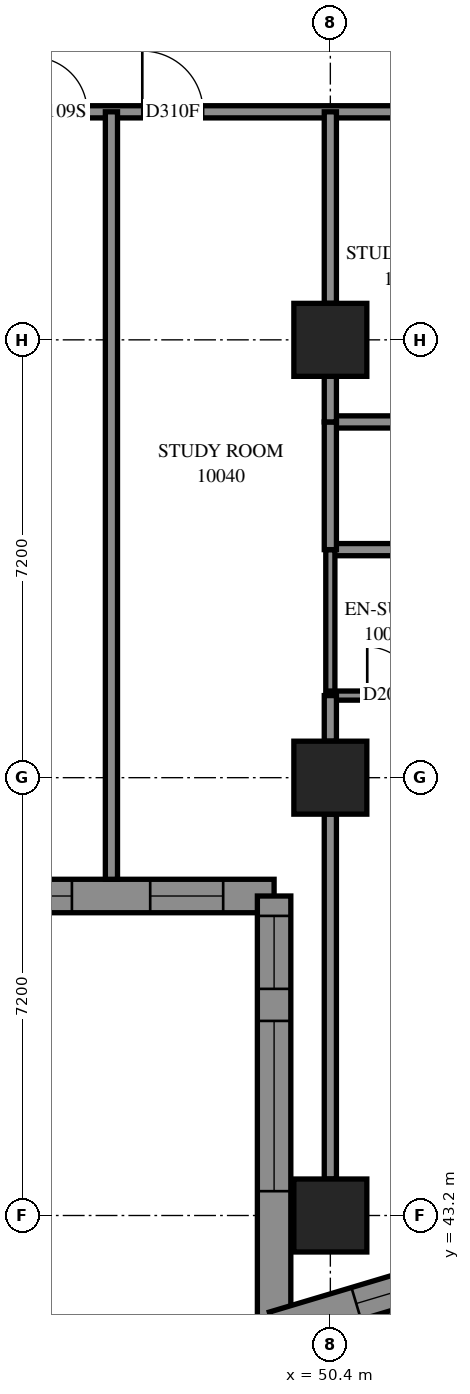
"""IFC4 building model, lengths in metres.
Left out: names, types, materials, properties, quantities, classifications, styles, units other than length and angle.
Written with IfcOpenShell. Run it as: python <this file> out.ifc"""

import sys

from ifc_helpers import new_model, si_unit, direction, frame, frame_2d, origin, origin_2d, place, context, subcontext, project, spatial, polyline, rectangle, outline, extrude, element, fill, save


model = new_model("IFC4")
c1 = context("Model", 3, precision=1e-05, world=origin(), true_north=direction((0.0, 1.0)))
c2 = subcontext(c1, "Body", "Model", "MODEL_VIEW")
j1 = project(units=[si_unit("LENGTHUNIT", "METRE"), si_unit("PLANEANGLEUNIT", "RADIAN")], contexts=[c1])
p1 = place(None, origin())
s1 = spatial("IfcSite", under=j1, at=p1, CompositionType="ELEMENT")
p2 = place(p1, origin())
s2 = spatial("IfcBuilding", under=s1, at=p2, CompositionType="ELEMENT")
p3 = place(p2, frame((0.0, 0.0, 40.6)))
s3 = spatial("IfcBuildingStorey", under=s2, at=p3, CompositionType="ELEMENT", Elevation=40.6)
for number, where, z_axis, x_axis in (
    (1, (50.4, 43.2, 0.0), (0.0, 0.0, 1.0), (1.0, 0.0, 0.0)),
    (2, (50.4, 50.4, 0.0), (0.0, 0.0, 1.0), (1.0, 0.0, 0.0)),
    (3, (50.4, 57.6, 0.0), (0.0, 0.0, 1.0), (1.0, 0.0, 0.0)),
):
    element("IfcColumn", number, at=place(p3, frame(where, z_axis=z_axis, x_axis=x_axis)), inside=s3, PredefinedType="COLUMN", context=c2, shape_type="SweptSolid", body=[
        extrude(rectangle(XDim=1.2, YDim=1.2, at=origin_2d()), origin(), (0.0, 0.0, 1.0), 3.1),
    ])
p4 = place(p3, frame((35.075, 48.454, 0.0), z_axis=(0.0, 0.0, 1.0), x_axis=(1.0, 0.0, 0.0)))
e4 = element("IfcWall", 4, at=p4, inside=s3, PredefinedType="SOLIDWALL", context=c2, shape_type="SweptSolid", body=[
    extrude(outline(polyline([(-0.275, -0.275), (14.125, -0.275), (14.675, 0.275), (0.275, 0.275), (-0.275, -0.275)])), origin(), (0.0, 0.0, 1.0), 3.1),
])
p5 = place(p4, frame((1.325, 0.0, 0.5)))
e5 = element("IfcOpeningElement", 5, at=p5, cuts=e4, PredefinedType="OPENING", context=c2, shape_type="SweptSolid", body=[
    extrude(rectangle(XDim=2.8, YDim=2.45, at=frame_2d((1.4, 1.225))), frame((0.0, 0.285, 0.0), z_axis=(0.0, -1.0, 0.0), x_axis=(1.0, 0.0, 0.0)), (0.0, 0.0, 1.0), 0.57),
])
p6 = place(p4, frame((4.925, 0.0, 0.5)))
e6 = element("IfcOpeningElement", 6, at=p6, cuts=e4, PredefinedType="OPENING", context=c2, shape_type="SweptSolid", body=[
    extrude(rectangle(XDim=2.8, YDim=2.45, at=frame_2d((1.4, 1.225))), frame((0.0, 0.285, 0.0), z_axis=(0.0, -1.0, 0.0), x_axis=(1.0, 0.0, 0.0)), (0.0, 0.0, 1.0), 0.57),
])
p7 = place(p4, frame((8.275, 0.0, 0.5)))
e7 = element("IfcOpeningElement", 7, at=p7, cuts=e4, PredefinedType="OPENING", context=c2, shape_type="SweptSolid", body=[
    extrude(rectangle(XDim=2.8, YDim=2.45, at=frame_2d((1.4, 1.225))), frame((0.0, 0.285, 0.0), z_axis=(0.0, -1.0, 0.0), x_axis=(1.0, 0.0, 0.0)), (0.0, 0.0, 1.0), 0.57),
])
p8 = place(p4, frame((12.363, 0.0, 0.5)))
e8 = element("IfcOpeningElement", 8, at=p8, cuts=e4, PredefinedType="OPENING", context=c2, shape_type="SweptSolid", body=[
    extrude(rectangle(XDim=1.2, YDim=2.45, at=frame_2d((0.6, 1.225))), frame((0.0, 0.285, 0.0), z_axis=(0.0, -1.0, 0.0), x_axis=(1.0, 0.0, 0.0)), (0.0, 0.0, 1.0), 0.57),
])
p9 = place(p3, frame((49.475, 48.454, 0.0), z_axis=(0.0, 0.0, 1.0), x_axis=(0.0, -1.0, 0.0)))
e9 = element("IfcWall", 9, at=p9, inside=s3, PredefinedType="SOLIDWALL", context=c2, shape_type="SweptSolid", body=[
    extrude(outline(polyline([(0.275, -0.275), (7.475, -0.275), (6.737, 0.275), (-0.275, 0.275), (0.275, -0.275)])), origin(), (0.0, 0.0, 1.0), 3.1),
])
p10 = place(p9, frame((2.054, 0.0, 0.5)))
e10 = element("IfcOpeningElement", 10, at=p10, cuts=e9, PredefinedType="OPENING", context=c2, shape_type="SweptSolid", body=[
    extrude(rectangle(XDim=2.8, YDim=2.45, at=frame_2d((1.4, 1.225))), frame((0.0, 0.285, 0.0), z_axis=(0.0, -1.0, 0.0), x_axis=(1.0, 0.0, 0.0)), (0.0, 0.0, 1.0), 0.57),
])
p11 = place(p9, frame((0.327, 0.0, 0.5)))
e11 = element("IfcOpeningElement", 11, at=p11, cuts=e9, PredefinedType="OPENING", context=c2, shape_type="SweptSolid", body=[
    extrude(rectangle(XDim=1.2, YDim=2.45, at=frame_2d((0.6, 1.225))), frame((0.0, 0.285, 0.0), z_axis=(0.0, -1.0, 0.0), x_axis=(1.0, 0.0, 0.0)), (0.0, 0.0, 1.0), 0.57),
])
p12 = place(p3, frame((49.475, 41.348, 0.0), z_axis=(0.0, 0.0, 1.0), x_axis=(0.9581327376, 0.2863243914, 0.0)))
e12 = element("IfcWall", 12, at=p12, inside=s3, PredefinedType="SOLIDWALL", context=c2, shape_type="SweptSolid", body=[
    extrude(outline(polyline([(-0.369, -0.275), (3.197, -0.275), (3.312, 0.275), (0.369, 0.275), (-0.369, -0.275)])), origin(), (0.0, 0.0, 1.0), 3.1),
])
p13 = place(p12, frame((1.41, 0.0, 0.5)))
e13 = element("IfcOpeningElement", 13, at=p13, cuts=e12, PredefinedType="OPENING", context=c2, shape_type="SweptSolid", body=[
    extrude(rectangle(XDim=1.2, YDim=2.45, at=frame_2d((0.6, 1.225))), frame((0.0, 0.285, 0.0), z_axis=(0.0, -1.0, 0.0), x_axis=(1.0, 0.0, 0.0)), (0.0, 0.0, 1.0), 0.57),
])
p14 = place(p3, frame((28.8, 61.35, 0.0), z_axis=(0.0, 0.0, 1.0), x_axis=(1.0, 0.0, 0.0)))
e14 = element("IfcWall", 14, at=p14, inside=s3, PredefinedType="PARTITIONING", context=c2, shape_type="SweptSolid", body=[
    extrude(rectangle(XDim=24.15, YDim=0.2, at=frame_2d((12.075, 0.0))), origin(), (0.0, 0.0, 1.0), 3.1),
])
p15 = place(p14, frame((2.3, 0.0, 0.0)))
e15 = element("IfcOpeningElement", 15, at=p15, cuts=e14, PredefinedType="OPENING", context=c2, shape_type="SweptSolid", body=[
    extrude(rectangle(XDim=0.9, YDim=2.1, at=frame_2d((0.45, 1.05))), frame((0.0, 0.11, 0.0), z_axis=(0.0, -1.0, 0.0), x_axis=(1.0, 0.0, 0.0)), (0.0, 0.0, 1.0), 0.22),
])
p16 = place(p14, frame((4.125, 0.0, 0.0)))
e16 = element("IfcOpeningElement", 16, at=p16, cuts=e14, PredefinedType="OPENING", context=c2, shape_type="SweptSolid", body=[
    extrude(rectangle(XDim=1.0, YDim=2.1, at=frame_2d((0.5, 1.05))), frame((0.0, 0.11, 0.0), z_axis=(0.0, -1.0, 0.0), x_axis=(1.0, 0.0, 0.0)), (0.0, 0.0, 1.0), 0.22),
])
p17 = place(p14, frame((11.061, 0.0, 0.0)))
e17 = element("IfcOpeningElement", 17, at=p17, cuts=e14, PredefinedType="OPENING", context=c2, shape_type="SweptSolid", body=[
    extrude(rectangle(XDim=0.9, YDim=2.1, at=frame_2d((0.45, 1.05))), frame((0.0, 0.11, 0.0), z_axis=(0.0, -1.0, 0.0), x_axis=(1.0, 0.0, 0.0)), (0.0, 0.0, 1.0), 0.22),
])
p18 = place(p14, frame((16.7, 0.0, 0.0)))
e18 = element("IfcOpeningElement", 18, at=p18, cuts=e14, PredefinedType="OPENING", context=c2, shape_type="SweptSolid", body=[
    extrude(rectangle(XDim=0.9, YDim=2.1, at=frame_2d((0.45, 1.05))), frame((0.0, 0.11, 0.0), z_axis=(0.0, -1.0, 0.0), x_axis=(1.0, 0.0, 0.0)), (0.0, 0.0, 1.0), 0.22),
])
p19 = place(p14, frame((18.508, 0.0, 0.0)))
e19 = element("IfcOpeningElement", 19, at=p19, cuts=e14, PredefinedType="OPENING", context=c2, shape_type="SweptSolid", body=[
    extrude(rectangle(XDim=1.0, YDim=2.1, at=frame_2d((0.5, 1.05))), frame((0.0, 0.11, 0.0), z_axis=(0.0, -1.0, 0.0), x_axis=(1.0, 0.0, 0.0)), (0.0, 0.0, 1.0), 0.22),
])
p20 = place(p14, frame((22.882, 0.0, 0.0)))
e20 = element("IfcOpeningElement", 20, at=p20, cuts=e14, PredefinedType="OPENING", context=c2, shape_type="SweptSolid", body=[
    extrude(rectangle(XDim=1.0, YDim=2.1, at=frame_2d((0.5, 1.05))), frame((0.0, 0.11, 0.0), z_axis=(0.0, -1.0, 0.0), x_axis=(1.0, 0.0, 0.0)), (0.0, 0.0, 1.0), 0.22),
])
p21 = place(p3, frame((46.8, 48.729, 0.0), z_axis=(0.0, 0.0, 1.0), x_axis=(0.0, 1.0, 0.0)))
e21 = element("IfcWall", 21, at=p21, inside=s3, PredefinedType="PARTITIONING", context=c2, shape_type="SweptSolid", body=[
    extrude(rectangle(XDim=12.621, YDim=0.2, at=frame_2d((6.311, 0.0))), origin(), (0.0, 0.0, 1.0), 3.1),
])
p22 = place(p3, frame((50.4, 43.8, 0.0), z_axis=(0.0, 0.0, 1.0), x_axis=(0.0, 1.0, 0.0)))
e22 = element("IfcWall", 22, at=p22, inside=s3, PredefinedType="PARTITIONING", context=c2, shape_type="SweptSolid", body=[
    extrude(rectangle(XDim=6.0, YDim=0.2, at=frame_2d((3.0, 0.0))), origin(), (0.0, 0.0, 1.0), 2.6),
])
p23 = place(p3, frame((50.4, 54.15, 0.0), z_axis=(0.0, 0.0, 1.0), x_axis=(1.0, 0.0, 0.0)))
e23 = element("IfcWall", 23, at=p23, inside=s3, PredefinedType="PARTITIONING", context=c2, shape_type="SweptSolid", body=[
    extrude(rectangle(XDim=4.7, YDim=0.2, at=frame_2d((2.35, 0.0))), origin(), (0.0, 0.0, 1.0), 3.1),
])
p24 = place(p23, frame((2.3, 0.0, 0.0)))
e24 = element("IfcOpeningElement", 24, at=p24, cuts=e23, PredefinedType="OPENING", context=c2, shape_type="SweptSolid", body=[
    extrude(rectangle(XDim=0.9, YDim=2.1, at=frame_2d((0.45, 1.05))), frame((0.0, 0.11, 0.0), z_axis=(0.0, -1.0, 0.0), x_axis=(1.0, 0.0, 0.0)), (0.0, 0.0, 1.0), 0.22),
])
p25 = place(p3, frame((50.4, 58.2, 0.0), z_axis=(0.0, 0.0, 1.0), x_axis=(0.0, 1.0, 0.0)))
e25 = element("IfcWall", 25, at=p25, inside=s3, PredefinedType="PARTITIONING", context=c2, shape_type="SweptSolid", body=[
    extrude(rectangle(XDim=3.15, YDim=0.2, at=frame_2d((1.575, 0.0))), origin(), (0.0, 0.0, 1.0), 3.1),
])
p26 = place(p3, frame((50.4, 56.25, 0.0), z_axis=(0.0, 0.0, 1.0), x_axis=(1.0, 0.0, 0.0)))
e26 = element("IfcWall", 26, at=p26, inside=s3, PredefinedType="PARTITIONING", context=c2, shape_type="SweptSolid", body=[
    extrude(rectangle(XDim=2.55, YDim=0.2, at=frame_2d((1.275, 0.0))), origin(), (0.0, 0.0, 1.0), 3.1),
])
p27 = place(p3, frame((50.4, 51.75, 0.0), z_axis=(0.0, 0.0, 1.0), x_axis=(0.0, 1.0, 0.0)))
e27 = element("IfcWall", 27, at=p27, inside=s3, PredefinedType="PARTITIONING", context=c2, shape_type="SweptSolid", body=[
    extrude(rectangle(XDim=2.4, YDim=0.15, at=frame_2d((1.2, 0.0))), origin(), (0.0, 0.0, 1.0), 3.1),
])
p28 = place(p3, frame((50.4, 54.15, 0.0), z_axis=(0.0, 0.0, 1.0), x_axis=(0.0, 1.0, 0.0)))
e28 = element("IfcWall", 28, at=p28, inside=s3, PredefinedType="PARTITIONING", context=c2, shape_type="SweptSolid", body=[
    extrude(rectangle(XDim=2.1, YDim=0.2, at=frame_2d((1.05, 0.0))), origin(), (0.0, 0.0, 1.0), 3.1),
])
p29 = place(p3, frame((50.4, 51.75, 0.0), z_axis=(0.0, 0.0, 1.0), x_axis=(1.0, 0.0, 0.0)))
e29 = element("IfcWall", 29, at=p29, inside=s3, PredefinedType="PARTITIONING", context=c2, shape_type="SweptSolid", body=[
    extrude(rectangle(XDim=1.9, YDim=0.15, at=frame_2d((0.95, 0.0))), origin(), (0.0, 0.0, 1.0), 3.1),
])
p30 = place(p29, frame((0.607, 0.0, 0.0)))
e30 = element("IfcOpeningElement", 30, at=p30, cuts=e29, PredefinedType="OPENING", context=c2, shape_type="SweptSolid", body=[
    extrude(rectangle(XDim=0.8, YDim=2.1, at=frame_2d((0.4, 1.05))), frame((0.0, 0.085, 0.0), z_axis=(0.0, -1.0, 0.0), x_axis=(1.0, 0.0, 0.0)), (0.0, 0.0, 1.0), 0.17),
])
for number, where, z_axis, x_axis in (
    (31, (50.4, 51.0, 0.0), (0.0, 0.0, 1.0), (0.0, 1.0, 0.0)),
    (32, (50.4, 56.25, 0.0), (0.0, 0.0, 1.0), (0.0, 1.0, 0.0)),
):
    element("IfcWall", number, at=place(p3, frame(where, z_axis=z_axis, x_axis=x_axis)), inside=s3, PredefinedType="PARTITIONING", context=c2, shape_type="SweptSolid", body=[
        extrude(rectangle(XDim=0.75, YDim=0.2, at=frame_2d((0.375, 0.0))), origin(), (0.0, 0.0, 1.0), 3.1),
    ])
p31 = place(p7, origin())
e33 = element("IfcWindow", 33, at=p31, inside=s3, PartitioningType="SINGLE_PANEL", PredefinedType="WINDOW", context=c2, shape_type="SweptSolid", body=[
    extrude(rectangle(XDim=2.8, YDim=2.45, at=frame_2d((1.4, 1.225))), frame((0.0, 0.155, 0.0), z_axis=(0.0, -1.0, 0.0), x_axis=(1.0, 0.0, 0.0)), (0.0, 0.0, 1.0), 0.06),
])
fill(e7, e33)
p32 = place(p8, origin())
e34 = element("IfcWindow", 34, at=p32, inside=s3, PartitioningType="SINGLE_PANEL", PredefinedType="WINDOW", context=c2, shape_type="SweptSolid", body=[
    extrude(rectangle(XDim=1.2, YDim=2.45, at=frame_2d((0.6, 1.225))), frame((0.0, 0.155, 0.0), z_axis=(0.0, -1.0, 0.0), x_axis=(1.0, 0.0, 0.0)), (0.0, 0.0, 1.0), 0.06),
])
fill(e8, e34)
p33 = place(p10, origin())
e35 = element("IfcWindow", 35, at=p33, inside=s3, PartitioningType="SINGLE_PANEL", PredefinedType="WINDOW", context=c2, shape_type="SweptSolid", body=[
    extrude(rectangle(XDim=2.8, YDim=2.45, at=frame_2d((1.4, 1.225))), frame((0.0, 0.155, 0.0), z_axis=(0.0, -1.0, 0.0), x_axis=(1.0, 0.0, 0.0)), (0.0, 0.0, 1.0), 0.06),
])
fill(e10, e35)
p34 = place(p11, origin())
e36 = element("IfcWindow", 36, at=p34, inside=s3, PartitioningType="SINGLE_PANEL", PredefinedType="WINDOW", context=c2, shape_type="SweptSolid", body=[
    extrude(rectangle(XDim=1.2, YDim=2.45, at=frame_2d((0.6, 1.225))), frame((0.0, 0.155, 0.0), z_axis=(0.0, -1.0, 0.0), x_axis=(1.0, 0.0, 0.0)), (0.0, 0.0, 1.0), 0.06),
])
fill(e11, e36)
p35 = place(p13, origin())
e37 = element("IfcWindow", 37, at=p35, inside=s3, PartitioningType="SINGLE_PANEL", PredefinedType="WINDOW", context=c2, shape_type="SweptSolid", body=[
    extrude(rectangle(XDim=1.2, YDim=2.45, at=frame_2d((0.6, 1.225))), frame((0.0, 0.155, 0.0), z_axis=(0.0, -1.0, 0.0), x_axis=(1.0, 0.0, 0.0)), (0.0, 0.0, 1.0), 0.06),
])
fill(e13, e37)
p36 = place(p18, origin())
e38 = element("IfcDoor", 38, at=p36, inside=s3, OperationType="SINGLE_SWING_LEFT", PredefinedType="DOOR", context=c2, shape_type="SweptSolid", body=[
    extrude(rectangle(XDim=0.9, YDim=2.1, at=frame_2d((0.45, 1.05))), frame((0.0, 0.025, 0.0), z_axis=(0.0, -1.0, 0.0), x_axis=(1.0, 0.0, 0.0)), (0.0, 0.0, 1.0), 0.05),
])
fill(e18, e38)
p37 = place(p19, origin())
e39 = element("IfcDoor", 39, at=p37, inside=s3, OperationType="SINGLE_SWING_RIGHT", PredefinedType="DOOR", context=c2, shape_type="SweptSolid", body=[
    extrude(rectangle(XDim=1.0, YDim=2.1, at=frame_2d((0.5, 1.05))), frame((0.0, 0.025, 0.0), z_axis=(0.0, -1.0, 0.0), x_axis=(1.0, 0.0, 0.0)), (0.0, 0.0, 1.0), 0.05),
])
fill(e19, e39)
p38 = place(p30, origin())
e40 = element("IfcDoor", 40, at=p38, inside=s3, OperationType="SINGLE_SWING_RIGHT", PredefinedType="DOOR", context=c2, shape_type="SweptSolid", body=[
    extrude(rectangle(XDim=0.8, YDim=2.1, at=frame_2d((0.4, 1.05))), frame((0.0, 0.025, 0.0), z_axis=(0.0, -1.0, 0.0), x_axis=(1.0, 0.0, 0.0)), (0.0, 0.0, 1.0), 0.05),
])
fill(e30, e40)
save(model, sys.argv[1])
